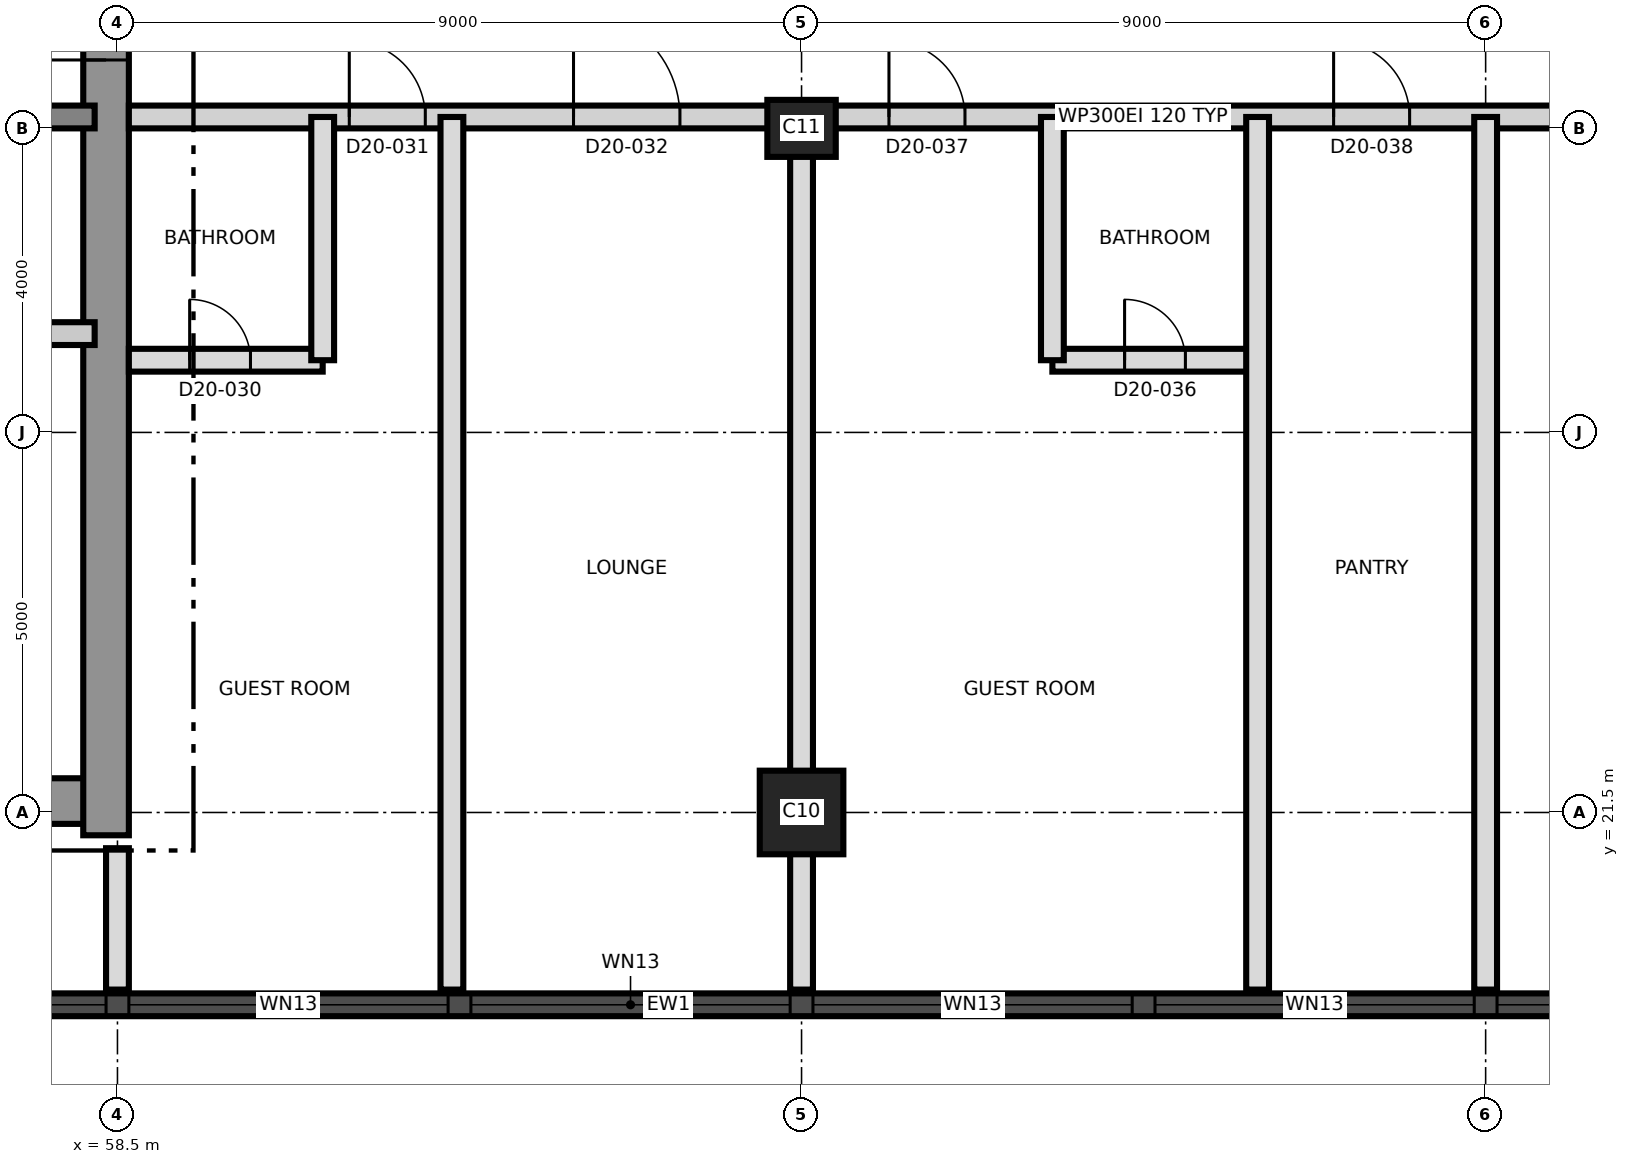
"""IFC4 building model, lengths in metres.
Left out: names, types, materials, properties, quantities, classifications, styles, units other than length and angle.
Written with IfcOpenShell. Run it as: python <this file> out.ifc"""

import sys

from ifc_helpers import new_model, si_unit, direction, frame, frame_2d, origin, origin_2d, place, context, subcontext, project, spatial, rectangle, extrude, element, fill, save


model = new_model("IFC4")
c1 = context("Model", 3, precision=1e-05, world=origin(), true_north=direction((0.0, 1.0)))
c2 = subcontext(c1, "Body", "Model", "MODEL_VIEW")
j1 = project(units=[si_unit("LENGTHUNIT", "METRE"), si_unit("PLANEANGLEUNIT", "RADIAN")], contexts=[c1])
p1 = place(None, origin())
s1 = spatial("IfcSite", under=j1, at=p1, CompositionType="ELEMENT")
p2 = place(p1, origin())
s2 = spatial("IfcBuilding", under=s1, at=p2, CompositionType="ELEMENT")
p3 = place(p2, frame((0.0, 0.0, 182.9)))
s3 = spatial("IfcBuildingStorey", under=s2, at=p3, CompositionType="ELEMENT", Elevation=182.9)
p4 = place(p3, frame((31.2, 21.65, 0.0), z_axis=(0.0, 0.0, 1.0), x_axis=(1.0, 0.0, 0.0)))
e1 = element("IfcWall", 1, at=p4, inside=s3, PredefinedType="SHEAR", context=c2, shape_type="SweptSolid", body=[
    extrude(rectangle(XDim=27.0, YDim=0.6, at=frame_2d((13.5, 0.0))), origin(), (0.0, 0.0, 1.0), 3.7),
])
p5 = place(p3, frame((58.35, 21.2, 0.0), z_axis=(0.0, 0.0, 1.0), x_axis=(0.0, 1.0, 0.0)))
e2 = element("IfcWall", 2, at=p5, inside=s3, PredefinedType="SHEAR", context=c2, shape_type="SweptSolid", body=[
    extrude(rectangle(XDim=18.6, YDim=0.6, at=frame_2d((9.3, 0.0))), origin(), (0.0, 0.0, 1.0), 3.7),
])
p6 = place(p5, frame((10.2, 0.0, 0.0)))
e3 = element("IfcOpeningElement", 3, at=p6, cuts=e2, PredefinedType="OPENING", context=c2, shape_type="SweptSolid", body=[
    extrude(rectangle(XDim=1.2, YDim=2.1, at=frame_2d((0.6, 1.05))), frame((0.0, 0.31, 0.0), z_axis=(0.0, -1.0, 0.0), x_axis=(1.0, 0.0, 0.0)), (0.0, 0.0, 1.0), 0.62),
])
p7 = place(p3, frame((31.8, 30.65, 0.0), z_axis=(0.0, 0.0, 1.0), x_axis=(1.0, 0.0, 0.0)))
e4 = element("IfcWall", 4, at=p7, inside=s3, PredefinedType="SHEAR", context=c2, shape_type="SweptSolid", body=[
    extrude(rectangle(XDim=26.4, YDim=0.3, at=frame_2d((13.2, 0.0))), origin(), (0.0, 0.0, 1.0), 3.7),
])
p8 = place(p7, frame((24.7, 0.0, 0.0)))
e5 = element("IfcOpeningElement", 5, at=p8, cuts=e4, PredefinedType="OPENING", context=c2, shape_type="SweptSolid", body=[
    extrude(rectangle(XDim=1.0, YDim=2.1, at=frame_2d((0.5, 1.05))), frame((0.0, 0.16, 0.0), z_axis=(0.0, -1.0, 0.0), x_axis=(1.0, 0.0, 0.0)), (0.0, 0.0, 1.0), 0.32),
])
p9 = place(p7, frame((4.0, 0.0, 0.0)))
e6 = element("IfcOpeningElement", 6, at=p9, cuts=e4, PredefinedType="OPENING", context=c2, shape_type="SweptSolid", body=[
    extrude(rectangle(XDim=1.0, YDim=2.1, at=frame_2d((0.5, 1.05))), frame((0.0, 0.16, 0.0), z_axis=(0.0, -1.0, 0.0), x_axis=(1.0, 0.0, 0.0)), (0.0, 0.0, 1.0), 0.32),
])
p10 = place(p3, frame((67.5, 21.5, 0.0), z_axis=(0.0, 0.0, 1.0), x_axis=(1.0, 0.0, 0.0)))
e7 = element("IfcColumn", 7, at=p10, inside=s3, PredefinedType="COLUMN", context=c2, shape_type="SweptSolid", body=[
    extrude(rectangle(XDim=1.1, YDim=1.1, at=origin_2d()), origin(), (0.0, 0.0, 1.0), 3.7),
])
p11 = place(p3, frame((67.5, 30.5, 0.0), z_axis=(0.0, 0.0, 1.0), x_axis=(1.0, 0.0, 0.0)))
e8 = element("IfcColumn", 8, at=p11, inside=s3, PredefinedType="COLUMN", context=c2, shape_type="SweptSolid", body=[
    extrude(rectangle(XDim=0.9, YDim=0.75, at=origin_2d()), origin(), (0.0, 0.0, 1.0), 3.7),
])
p12 = place(p3, frame((44.01, 18.97, 0.0), z_axis=(0.0, 0.0, 1.0), x_axis=(1.0, 0.0, 0.0)))
e9 = element("IfcWall", 9, at=p12, inside=s3, PredefinedType="SOLIDWALL", context=c2, shape_type="SweptSolid", body=[
    extrude(rectangle(XDim=43.478, YDim=0.3, at=frame_2d((21.739, 0.0))), origin(), (0.0, 0.0, 1.0), 3.4),
])
p13 = place(p12, frame((1.845, 0.0, 0.3)))
e10 = element("IfcOpeningElement", 10, at=p13, cuts=e9, PredefinedType="OPENING", context=c2, shape_type="SweptSolid", body=[
    extrude(rectangle(XDim=1.8, YDim=2.4, at=frame_2d((0.9, 1.2))), frame((0.0, 0.16, 0.0), z_axis=(0.0, -1.0, 0.0), x_axis=(1.0, 0.0, 0.0)), (0.0, 0.0, 1.0), 0.32),
])
p14 = place(p12, frame((5.64, 0.0, 0.9)))
e11 = element("IfcOpeningElement", 11, at=p14, cuts=e9, PredefinedType="OPENING", context=c2, shape_type="SweptSolid", body=[
    extrude(rectangle(XDim=4.2, YDim=1.7, at=frame_2d((2.1, 0.85))), frame((0.0, 0.16, 0.0), z_axis=(0.0, -1.0, 0.0), x_axis=(1.0, 0.0, 0.0)), (0.0, 0.0, 1.0), 0.32),
])
p15 = place(p12, frame((10.14, 0.0, 0.9)))
e12 = element("IfcOpeningElement", 12, at=p15, cuts=e9, PredefinedType="OPENING", context=c2, shape_type="SweptSolid", body=[
    extrude(rectangle(XDim=4.2, YDim=1.7, at=frame_2d((2.1, 0.85))), frame((0.0, 0.16, 0.0), z_axis=(0.0, -1.0, 0.0), x_axis=(1.0, 0.0, 0.0)), (0.0, 0.0, 1.0), 0.32),
])
p16 = place(p12, frame((14.64, 0.0, 0.9)))
e13 = element("IfcOpeningElement", 13, at=p16, cuts=e9, PredefinedType="OPENING", context=c2, shape_type="SweptSolid", body=[
    extrude(rectangle(XDim=4.2, YDim=1.7, at=frame_2d((2.1, 0.85))), frame((0.0, 0.16, 0.0), z_axis=(0.0, -1.0, 0.0), x_axis=(1.0, 0.0, 0.0)), (0.0, 0.0, 1.0), 0.32),
])
p17 = place(p12, frame((19.14, 0.0, 0.9)))
e14 = element("IfcOpeningElement", 14, at=p17, cuts=e9, PredefinedType="OPENING", context=c2, shape_type="SweptSolid", body=[
    extrude(rectangle(XDim=4.2, YDim=1.7, at=frame_2d((2.1, 0.85))), frame((0.0, 0.16, 0.0), z_axis=(0.0, -1.0, 0.0), x_axis=(1.0, 0.0, 0.0)), (0.0, 0.0, 1.0), 0.32),
])
p18 = place(p12, frame((23.64, 0.0, 0.9)))
e15 = element("IfcOpeningElement", 15, at=p18, cuts=e9, PredefinedType="OPENING", context=c2, shape_type="SweptSolid", body=[
    extrude(rectangle(XDim=4.2, YDim=1.7, at=frame_2d((2.1, 0.85))), frame((0.0, 0.16, 0.0), z_axis=(0.0, -1.0, 0.0), x_axis=(1.0, 0.0, 0.0)), (0.0, 0.0, 1.0), 0.32),
])
p19 = place(p12, frame((28.14, 0.0, 0.9)))
e16 = element("IfcOpeningElement", 16, at=p19, cuts=e9, PredefinedType="OPENING", context=c2, shape_type="SweptSolid", body=[
    extrude(rectangle(XDim=4.2, YDim=1.7, at=frame_2d((2.1, 0.85))), frame((0.0, 0.16, 0.0), z_axis=(0.0, -1.0, 0.0), x_axis=(1.0, 0.0, 0.0)), (0.0, 0.0, 1.0), 0.32),
])
p20 = place(p12, frame((32.64, 0.0, 0.9)))
e17 = element("IfcOpeningElement", 17, at=p20, cuts=e9, PredefinedType="OPENING", context=c2, shape_type="SweptSolid", body=[
    extrude(rectangle(XDim=4.2, YDim=1.7, at=frame_2d((2.1, 0.85))), frame((0.0, 0.16, 0.0), z_axis=(0.0, -1.0, 0.0), x_axis=(1.0, 0.0, 0.0)), (0.0, 0.0, 1.0), 0.32),
])
p21 = place(p12, frame((37.14, 0.0, 0.9)))
e18 = element("IfcOpeningElement", 18, at=p21, cuts=e9, PredefinedType="OPENING", context=c2, shape_type="SweptSolid", body=[
    extrude(rectangle(XDim=4.2, YDim=1.7, at=frame_2d((2.1, 0.85))), frame((0.0, 0.16, 0.0), z_axis=(0.0, -1.0, 0.0), x_axis=(1.0, 0.0, 0.0)), (0.0, 0.0, 1.0), 0.32),
])
p22 = place(p3, frame((55.8, 27.8, 0.0), z_axis=(0.0, 0.0, 1.0), x_axis=(1.0, 0.0, 0.0)))
e19 = element("IfcWall", 19, at=p22, inside=s3, PredefinedType="PARTITIONING", context=c2, shape_type="SweptSolid", body=[
    extrude(rectangle(XDim=2.4, YDim=0.3, at=frame_2d((1.2, 0.0))), origin(), (0.0, 0.0, 1.0), 3.4),
])
p23 = place(p22, frame((0.75, 0.0, 0.0)))
e20 = element("IfcOpeningElement", 20, at=p23, cuts=e19, PredefinedType="OPENING", context=c2, shape_type="SweptSolid", body=[
    extrude(rectangle(XDim=0.9, YDim=2.1, at=frame_2d((0.45, 1.05))), frame((0.0, 0.16, 0.0), z_axis=(0.0, -1.0, 0.0), x_axis=(1.0, 0.0, 0.0)), (0.0, 0.0, 1.0), 0.32),
])
p24 = place(p3, frame((58.65, 27.45, 0.0), z_axis=(0.0, 0.0, 1.0), x_axis=(1.0, 0.0, 0.0)))
e21 = element("IfcWall", 21, at=p24, inside=s3, PredefinedType="PARTITIONING", context=c2, shape_type="SweptSolid", body=[
    extrude(rectangle(XDim=2.55, YDim=0.3, at=frame_2d((1.275, 0.0))), origin(), (0.0, 0.0, 1.0), 3.4),
])
p25 = place(p24, frame((0.8, 0.0, 0.0)))
e22 = element("IfcOpeningElement", 22, at=p25, cuts=e21, PredefinedType="OPENING", context=c2, shape_type="SweptSolid", body=[
    extrude(rectangle(XDim=0.8, YDim=2.1, at=frame_2d((0.4, 1.05))), frame((0.0, 0.16, 0.0), z_axis=(0.0, -1.0, 0.0), x_axis=(1.0, 0.0, 0.0)), (0.0, 0.0, 1.0), 0.32),
])
p26 = place(p3, frame((70.8, 27.45, 0.0), z_axis=(0.0, 0.0, 1.0), x_axis=(1.0, 0.0, 0.0)))
e23 = element("IfcWall", 23, at=p26, inside=s3, PredefinedType="PARTITIONING", context=c2, shape_type="SweptSolid", body=[
    extrude(rectangle(XDim=2.7, YDim=0.3, at=frame_2d((1.35, 0.0))), origin(), (0.0, 0.0, 1.0), 3.4),
])
p27 = place(p26, frame((0.95, 0.0, 0.0)))
e24 = element("IfcOpeningElement", 24, at=p27, cuts=e23, PredefinedType="OPENING", context=c2, shape_type="SweptSolid", body=[
    extrude(rectangle(XDim=0.8, YDim=2.1, at=frame_2d((0.4, 1.05))), frame((0.0, 0.16, 0.0), z_axis=(0.0, -1.0, 0.0), x_axis=(1.0, 0.0, 0.0)), (0.0, 0.0, 1.0), 0.32),
])
p28 = place(p3, frame((58.65, 30.65, 0.0), z_axis=(0.0, 0.0, 1.0), x_axis=(1.0, 0.0, 0.0)))
e25 = element("IfcWall", 25, at=p28, inside=s3, PredefinedType="PARTITIONING", context=c2, shape_type="SweptSolid", body=[
    extrude(rectangle(XDim=26.68, YDim=0.3, at=frame_2d((13.34, 0.0))), origin(), (0.0, 0.0, 1.0), 3.4),
])
p29 = place(p28, frame((2.9, 0.0, 0.0)))
e26 = element("IfcOpeningElement", 26, at=p29, cuts=e25, PredefinedType="OPENING", context=c2, shape_type="SweptSolid", body=[
    extrude(rectangle(XDim=1.0, YDim=2.1, at=frame_2d((0.5, 1.05))), frame((0.0, 0.16, 0.0), z_axis=(0.0, -1.0, 0.0), x_axis=(1.0, 0.0, 0.0)), (0.0, 0.0, 1.0), 0.32),
])
p30 = place(p28, frame((5.85, 0.0, 0.0)))
e27 = element("IfcOpeningElement", 27, at=p30, cuts=e25, PredefinedType="OPENING", context=c2, shape_type="SweptSolid", body=[
    extrude(rectangle(XDim=1.4, YDim=2.1, at=frame_2d((0.7, 1.05))), frame((0.0, 0.16, 0.0), z_axis=(0.0, -1.0, 0.0), x_axis=(1.0, 0.0, 0.0)), (0.0, 0.0, 1.0), 0.32),
])
p31 = place(p28, frame((10.0, 0.0, 0.0)))
e28 = element("IfcOpeningElement", 28, at=p31, cuts=e25, PredefinedType="OPENING", context=c2, shape_type="SweptSolid", body=[
    extrude(rectangle(XDim=1.0, YDim=2.1, at=frame_2d((0.5, 1.05))), frame((0.0, 0.16, 0.0), z_axis=(0.0, -1.0, 0.0), x_axis=(1.0, 0.0, 0.0)), (0.0, 0.0, 1.0), 0.32),
])
p32 = place(p28, frame((15.85, 0.0, 0.0)))
e29 = element("IfcOpeningElement", 29, at=p32, cuts=e25, PredefinedType="OPENING", context=c2, shape_type="SweptSolid", body=[
    extrude(rectangle(XDim=1.0, YDim=2.1, at=frame_2d((0.5, 1.05))), frame((0.0, 0.16, 0.0), z_axis=(0.0, -1.0, 0.0), x_axis=(1.0, 0.0, 0.0)), (0.0, 0.0, 1.0), 0.32),
])
p33 = place(p28, frame((20.2, 0.0, 0.0)))
e30 = element("IfcOpeningElement", 30, at=p33, cuts=e25, PredefinedType="OPENING", context=c2, shape_type="SweptSolid", body=[
    extrude(rectangle(XDim=1.0, YDim=2.1, at=frame_2d((0.5, 1.05))), frame((0.0, 0.16, 0.0), z_axis=(0.0, -1.0, 0.0), x_axis=(1.0, 0.0, 0.0)), (0.0, 0.0, 1.0), 0.32),
])
p34 = place(p3, frame((58.5, 19.17, 0.0), z_axis=(0.0, 0.0, 1.0), x_axis=(0.0, 1.0, 0.0)))
e31 = element("IfcWall", 31, at=p34, inside=s3, PredefinedType="PARTITIONING", context=c2, shape_type="SweptSolid", body=[
    extrude(rectangle(XDim=1.86, YDim=0.3, at=frame_2d((0.93, 0.0))), origin(), (0.0, 0.0, 1.0), 3.4),
])
p35 = place(p3, frame((61.2, 27.45, 0.0), z_axis=(0.0, 0.0, 1.0), x_axis=(0.0, 1.0, 0.0)))
e32 = element("IfcWall", 32, at=p35, inside=s3, PredefinedType="PARTITIONING", context=c2, shape_type="SweptSolid", body=[
    extrude(rectangle(XDim=3.2, YDim=0.3, at=frame_2d((1.6, 0.0))), origin(), (0.0, 0.0, 1.0), 3.4),
])
for number, where, z_axis, x_axis in (
    (33, (62.9, 19.17, 0.0), (0.0, 0.0, 1.0), (0.0, 1.0, 0.0)),
    (34, (67.5, 19.17, 0.0), (0.0, 0.0, 1.0), (0.0, 1.0, 0.0)),
):
    element("IfcWall", number, at=place(p3, frame(where, z_axis=z_axis, x_axis=x_axis)), inside=s3, PredefinedType="PARTITIONING", context=c2, shape_type="SweptSolid", body=[
        extrude(rectangle(XDim=11.48, YDim=0.3, at=frame_2d((5.74, 0.0))), origin(), (0.0, 0.0, 1.0), 3.4),
    ])
p36 = place(p3, frame((70.8, 27.45, 0.0), z_axis=(0.0, 0.0, 1.0), x_axis=(0.0, 1.0, 0.0)))
e35 = element("IfcWall", 35, at=p36, inside=s3, PredefinedType="PARTITIONING", context=c2, shape_type="SweptSolid", body=[
    extrude(rectangle(XDim=3.2, YDim=0.3, at=frame_2d((1.6, 0.0))), origin(), (0.0, 0.0, 1.0), 3.4),
])
for number, where, z_axis, x_axis in (
    (36, (73.5, 19.17, 0.0), (0.0, 0.0, 1.0), (0.0, 1.0, 0.0)),
    (37, (76.5, 19.17, 0.0), (0.0, 0.0, 1.0), (0.0, 1.0, 0.0)),
):
    element("IfcWall", number, at=place(p3, frame(where, z_axis=z_axis, x_axis=x_axis)), inside=s3, PredefinedType="PARTITIONING", context=c2, shape_type="SweptSolid", body=[
        extrude(rectangle(XDim=11.48, YDim=0.3, at=frame_2d((5.74, 0.0))), origin(), (0.0, 0.0, 1.0), 3.4),
    ])
p37 = place(p15, origin())
e38 = element("IfcWindow", 38, at=p37, inside=s3, PartitioningType="SINGLE_PANEL", PredefinedType="WINDOW", context=c2, shape_type="SweptSolid", body=[
    extrude(rectangle(XDim=4.2, YDim=1.7, at=frame_2d((2.1, 0.85))), frame((0.0, 0.03, 0.0), z_axis=(0.0, -1.0, 0.0), x_axis=(1.0, 0.0, 0.0)), (0.0, 0.0, 1.0), 0.06),
])
fill(e12, e38)
p38 = place(p16, origin())
e39 = element("IfcWindow", 39, at=p38, inside=s3, PartitioningType="SINGLE_PANEL", PredefinedType="WINDOW", context=c2, shape_type="SweptSolid", body=[
    extrude(rectangle(XDim=4.2, YDim=1.7, at=frame_2d((2.1, 0.85))), frame((0.0, 0.03, 0.0), z_axis=(0.0, -1.0, 0.0), x_axis=(1.0, 0.0, 0.0)), (0.0, 0.0, 1.0), 0.06),
])
fill(e13, e39)
p39 = place(p17, origin())
e40 = element("IfcWindow", 40, at=p39, inside=s3, PartitioningType="SINGLE_PANEL", PredefinedType="WINDOW", context=c2, shape_type="SweptSolid", body=[
    extrude(rectangle(XDim=4.2, YDim=1.7, at=frame_2d((2.1, 0.85))), frame((0.0, 0.03, 0.0), z_axis=(0.0, -1.0, 0.0), x_axis=(1.0, 0.0, 0.0)), (0.0, 0.0, 1.0), 0.06),
])
fill(e14, e40)
p40 = place(p18, origin())
e41 = element("IfcWindow", 41, at=p40, inside=s3, PartitioningType="SINGLE_PANEL", PredefinedType="WINDOW", context=c2, shape_type="SweptSolid", body=[
    extrude(rectangle(XDim=4.2, YDim=1.7, at=frame_2d((2.1, 0.85))), frame((0.0, 0.03, 0.0), z_axis=(0.0, -1.0, 0.0), x_axis=(1.0, 0.0, 0.0)), (0.0, 0.0, 1.0), 0.06),
])
fill(e15, e41)
p41 = place(p19, origin())
e42 = element("IfcWindow", 42, at=p41, inside=s3, PartitioningType="SINGLE_PANEL", PredefinedType="WINDOW", context=c2, shape_type="SweptSolid", body=[
    extrude(rectangle(XDim=4.2, YDim=1.7, at=frame_2d((2.1, 0.85))), frame((0.0, 0.03, 0.0), z_axis=(0.0, -1.0, 0.0), x_axis=(1.0, 0.0, 0.0)), (0.0, 0.0, 1.0), 0.06),
])
fill(e16, e42)
p42 = place(p20, origin())
e43 = element("IfcWindow", 43, at=p42, inside=s3, PartitioningType="SINGLE_PANEL", PredefinedType="WINDOW", context=c2, shape_type="SweptSolid", body=[
    extrude(rectangle(XDim=4.2, YDim=1.7, at=frame_2d((2.1, 0.85))), frame((0.0, 0.03, 0.0), z_axis=(0.0, -1.0, 0.0), x_axis=(1.0, 0.0, 0.0)), (0.0, 0.0, 1.0), 0.06),
])
fill(e17, e43)
p43 = place(p6, origin())
e44 = element("IfcDoor", 44, at=p43, inside=s3, OperationType="SINGLE_SWING_LEFT", PredefinedType="DOOR", context=c2, shape_type="SweptSolid", body=[
    extrude(rectangle(XDim=1.2, YDim=2.1, at=frame_2d((0.6, 1.05))), frame((0.0, 0.025, 0.0), z_axis=(0.0, -1.0, 0.0), x_axis=(1.0, 0.0, 0.0)), (0.0, 0.0, 1.0), 0.05),
])
fill(e3, e44)
p44 = place(p25, origin())
e45 = element("IfcDoor", 45, at=p44, inside=s3, OperationType="SINGLE_SWING_LEFT", PredefinedType="DOOR", context=c2, shape_type="SweptSolid", body=[
    extrude(rectangle(XDim=0.8, YDim=2.1, at=frame_2d((0.4, 1.05))), frame((0.0, 0.025, 0.0), z_axis=(0.0, -1.0, 0.0), x_axis=(1.0, 0.0, 0.0)), (0.0, 0.0, 1.0), 0.05),
])
fill(e22, e45)
p45 = place(p29, origin())
e46 = element("IfcDoor", 46, at=p45, inside=s3, OperationType="SINGLE_SWING_LEFT", PredefinedType="DOOR", context=c2, shape_type="SweptSolid", body=[
    extrude(rectangle(XDim=1.0, YDim=2.1, at=frame_2d((0.5, 1.05))), frame((0.0, 0.025, 0.0), z_axis=(0.0, -1.0, 0.0), x_axis=(1.0, 0.0, 0.0)), (0.0, 0.0, 1.0), 0.05),
])
fill(e26, e46)
p46 = place(p30, origin())
e47 = element("IfcDoor", 47, at=p46, inside=s3, OperationType="SINGLE_SWING_RIGHT", PredefinedType="DOOR", context=c2, shape_type="SweptSolid", body=[
    extrude(rectangle(XDim=1.4, YDim=2.1, at=frame_2d((0.7, 1.05))), frame((0.0, 0.025, 0.0), z_axis=(0.0, -1.0, 0.0), x_axis=(1.0, 0.0, 0.0)), (0.0, 0.0, 1.0), 0.05),
])
fill(e27, e47)
p47 = place(p27, origin())
e48 = element("IfcDoor", 48, at=p47, inside=s3, OperationType="SINGLE_SWING_LEFT", PredefinedType="DOOR", context=c2, shape_type="SweptSolid", body=[
    extrude(rectangle(XDim=0.8, YDim=2.1, at=frame_2d((0.4, 1.05))), frame((0.0, 0.025, 0.0), z_axis=(0.0, -1.0, 0.0), x_axis=(1.0, 0.0, 0.0)), (0.0, 0.0, 1.0), 0.05),
])
fill(e24, e48)
p48 = place(p31, origin())
e49 = element("IfcDoor", 49, at=p48, inside=s3, OperationType="SINGLE_SWING_LEFT", PredefinedType="DOOR", context=c2, shape_type="SweptSolid", body=[
    extrude(rectangle(XDim=1.0, YDim=2.1, at=frame_2d((0.5, 1.05))), frame((0.0, 0.025, 0.0), z_axis=(0.0, -1.0, 0.0), x_axis=(1.0, 0.0, 0.0)), (0.0, 0.0, 1.0), 0.05),
])
fill(e28, e49)
p49 = place(p32, origin())
e50 = element("IfcDoor", 50, at=p49, inside=s3, OperationType="SINGLE_SWING_RIGHT", PredefinedType="DOOR", context=c2, shape_type="SweptSolid", body=[
    extrude(rectangle(XDim=1.0, YDim=2.1, at=frame_2d((0.5, 1.05))), frame((0.0, 0.025, 0.0), z_axis=(0.0, -1.0, 0.0), x_axis=(1.0, 0.0, 0.0)), (0.0, 0.0, 1.0), 0.05),
])
fill(e29, e50)
save(model, sys.argv[1])
